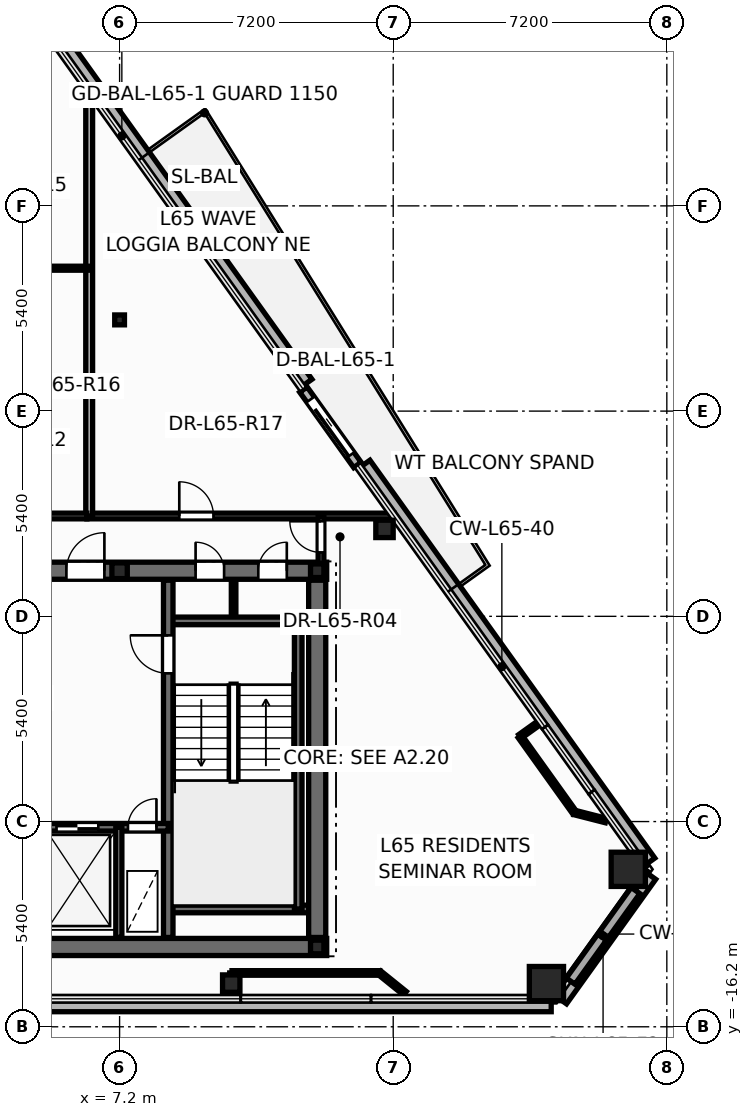
"""IFC4 building model, lengths in metres.
Left out: names, types, materials, properties, quantities, classifications, styles, units other than length and angle.
Written with IfcOpenShell. Run it as: python <this file> out.ifc"""

import sys

from ifc_helpers import new_model, si_unit, direction, frame, frame_2d, origin, origin_2d, place, context, subcontext, project, spatial, rectangle, hollow_rectangle, hollow_circle, i_section, extrude, element, fill, save


model = new_model("IFC4")
c1 = context("Model", 3, precision=1e-05, world=origin(), true_north=direction((0.0, 1.0)))
c2 = subcontext(c1, "Body", "Model", "MODEL_VIEW")
j1 = project(units=[si_unit("LENGTHUNIT", "METRE"), si_unit("PLANEANGLEUNIT", "RADIAN")], contexts=[c1])
p1 = place(None, origin())
s1 = spatial("IfcSite", under=j1, at=p1, CompositionType="ELEMENT")
p2 = place(p1, origin())
s2 = spatial("IfcBuilding", under=s1, at=p2, CompositionType="ELEMENT")
p3 = place(p2, frame((0.0, 0.0, 249.0)))
s3 = spatial("IfcBuildingStorey", under=s2, at=p3, CompositionType="ELEMENT", Elevation=249.0)
for number, where, z_axis, x_axis in (
    (1, (18.432, -15.063, 0.0), (0.0, 0.0, 1.0), (1.0, 0.0, 0.0)),
    (2, (20.585, -12.057, 0.0), (0.0, 0.0, 1.0), (1.0, 0.0, 0.0)),
):
    element("IfcColumn", number, at=place(p3, frame(where, z_axis=z_axis, x_axis=x_axis)), inside=s3, PredefinedType="COLUMN", context=c2, shape_type="SweptSolid", body=[
        extrude(hollow_rectangle(XDim=0.9, YDim=0.9, WallThickness=0.04, at=origin_2d()), origin(), (0.0, 0.0, 1.0), 3.6),
    ])
for number, where, z_axis, x_axis in (
    (3, (10.138, -15.063, 0.0), (0.0, 0.0, 1.0), (1.0, 0.0, 0.0)),
    (4, (14.171, -3.099, 0.0), (0.0, 0.0, 1.0), (1.0, 0.0, 0.0)),
    (5, (8.673, 4.579, 0.0), (0.0, 0.0, 1.0), (1.0, 0.0, 0.0)),
):
    element("IfcColumn", number, at=place(p3, frame(where, z_axis=z_axis, x_axis=x_axis)), inside=s3, PredefinedType="COLUMN", context=c2, shape_type="SweptSolid", body=[
        extrude(hollow_circle(Radius=0.229, WallThickness=0.016, at=origin_2d()), origin(), (0.0, 0.0, 1.0), 3.6),
    ])
for number, where, z_axis, x_axis in (
    (6, (12.4, -14.1, 0.0), (0.0, 0.0, 1.0), (1.0, 0.0, 0.0)),
    (7, (12.4, -4.2, 0.0), (0.0, 0.0, 1.0), (1.0, 0.0, 0.0)),
):
    element("IfcColumn", number, at=place(p3, frame(where, z_axis=z_axis, x_axis=x_axis)), inside=s3, PredefinedType="COLUMN", context=c2, shape_type="SweptSolid", body=[
        extrude(i_section(OverallWidth=0.352, OverallDepth=0.359, WebThickness=0.018, FlangeThickness=0.026, at=origin_2d()), origin(), (0.0, 0.0, 1.0), 3.6),
    ])
p4 = place(p3, frame((7.2, -4.2, 0.0), z_axis=(0.0, 0.0, 1.0), x_axis=(1.0, 0.0, 0.0)))
e8 = element("IfcColumn", 8, at=p4, inside=s3, PredefinedType="PILASTER", context=c2, shape_type="SweptSolid", body=[
    extrude(i_section(OverallWidth=0.405, OverallDepth=0.414, WebThickness=0.022, FlangeThickness=0.032, at=origin_2d()), origin(), (0.0, 0.0, 1.0), 3.6),
])
p5 = place(p3, frame((7.2, 2.4, 0.0), z_axis=(0.0, 0.0, 1.0), x_axis=(1.0, 0.0, 0.0)))
e9 = element("IfcColumn", 9, at=p5, inside=s3, PredefinedType="COLUMN", context=c2, shape_type="SweptSolid", body=[
    extrude(i_section(OverallWidth=0.256, OverallDepth=0.26, WebThickness=0.01, FlangeThickness=0.017, at=origin_2d()), origin(), (0.0, 0.0, 1.0), 3.6),
])
p6 = place(p3, frame((-18.558, -15.623, -0.2), z_axis=(0.0, 0.0, 1.0), x_axis=(1.0, 0.0, 0.0)))
e10 = element("IfcWall", 10, at=p6, inside=s3, PredefinedType="PARAPET", context=c2, shape_type="SweptSolid", body=[
    extrude(rectangle(XDim=37.115, YDim=0.36, at=frame_2d((18.558, 0.0))), origin(), (0.0, 0.0, 1.0), 0.38),
])
p7 = place(p3, frame((18.814, -15.491, -0.2), z_axis=(0.0, 0.0, 1.0), x_axis=(0.582223401732, 0.813028849719, 0.0)))
e11 = element("IfcWall", 11, at=p7, inside=s3, PredefinedType="PARAPET", context=c2, shape_type="SweptSolid", body=[
    extrude(rectangle(XDim=4.03, YDim=0.36, at=frame_2d((2.015, 0.0))), origin(), (0.0, 0.0, 1.0), 0.38),
])
p8 = place(p3, frame((21.137, -11.866, -0.2), z_axis=(0.0, 0.0, 1.0), x_axis=(-0.582197369703, 0.813047491055, 0.0)))
e12 = element("IfcWall", 12, at=p8, inside=s3, PredefinedType="PARAPET", context=c2, shape_type="SweptSolid", body=[
    extrude(rectangle(XDim=12.876, YDim=0.36, at=frame_2d((6.438, 0.0))), origin(), (0.0, 0.0, 1.0), 0.38),
])
p9 = place(p3, frame((12.115, 0.733, -0.2), z_axis=(0.0, 0.0, 1.0), x_axis=(-0.582205107077, 0.813041950513, 0.0)))
e13 = element("IfcWall", 13, at=p9, inside=s3, PredefinedType="PARAPET", context=c2, shape_type="SweptSolid", body=[
    extrude(rectangle(XDim=16.235, YDim=0.36, at=frame_2d((8.117, 0.0))), origin(), (0.0, 0.0, 1.0), 0.38),
])
p10 = place(p3, frame((13.458, -1.417, -0.015), z_axis=(0.0, 0.0, 1.0), x_axis=(-0.582146480264, 0.813083928949, 0.0)))
e14 = element("IfcWall", 14, at=p10, inside=s3, PredefinedType="STANDARD", context=c2, shape_type="SweptSolid", body=[
    extrude(rectangle(XDim=2.44, YDim=0.24, at=frame_2d((1.22, 0.0))), origin(), (0.0, 0.0, 1.0), 2.878),
])
p11 = place(p10, frame((0.32, 0.0, 0.015)))
e15 = element("IfcOpeningElement", 15, at=p11, cuts=e14, PredefinedType="OPENING", context=c2, shape_type="SweptSolid", body=[
    extrude(rectangle(XDim=1.806, YDim=2.204, at=frame_2d((0.9, 1.102))), frame((0.0, 0.13, 0.0), z_axis=(0.0, -1.0, 0.0), x_axis=(1.0, 0.0, 0.0)), (0.0, 0.0, 1.0), 0.26),
])
p12 = place(p3, frame((10.2, -5.52, 0.0), z_axis=(0.0, 0.0, 1.0), x_axis=(0.0, 1.0, 0.0)))
e16 = element("IfcWall", 16, at=p12, inside=s3, PredefinedType="PARTITIONING", context=c2, shape_type="SweptSolid", body=[
    extrude(rectangle(XDim=1.12, YDim=0.12, at=frame_2d((0.56, 0.0))), origin(), (0.0, 0.0, 1.0), 3.345),
])
p13 = place(p3, frame((-12.65, -14.1, 0.0), z_axis=(0.0, 0.0, 1.0), x_axis=(1.0, 0.0, 0.0)))
e17 = element("IfcWall", 17, at=p13, inside=s3, PredefinedType="SHEAR", context=c2, shape_type="SweptSolid", body=[
    extrude(rectangle(XDim=25.3, YDim=0.45, at=frame_2d((12.65, 0.0))), origin(), (0.0, 0.0, 1.0), 3.6),
])
p14 = place(p3, frame((-12.65, -4.2, 0.0), z_axis=(0.0, 0.0, 1.0), x_axis=(1.0, 0.0, 0.0)))
e18 = element("IfcWall", 18, at=p14, inside=s3, PredefinedType="SHEAR", context=c2, shape_type="SweptSolid", body=[
    extrude(rectangle(XDim=25.3, YDim=0.45, at=frame_2d((12.65, 0.0))), origin(), (0.0, 0.0, 1.0), 3.6),
])
p15 = place(p14, frame((0.95, 0.0, 0.0)))
e19 = element("IfcOpeningElement", 19, at=p15, cuts=e18, PredefinedType="OPENING", context=c2, shape_type="SweptSolid", body=[
    extrude(rectangle(XDim=0.756, YDim=2.054, at=frame_2d((0.375, 1.027))), frame((0.0, 0.235, 0.0), z_axis=(0.0, -1.0, 0.0), x_axis=(1.0, 0.0, 0.0)), (0.0, 0.0, 1.0), 0.47),
])
p16 = place(p14, frame((2.6, 0.0, 0.0)))
e20 = element("IfcOpeningElement", 20, at=p16, cuts=e18, PredefinedType="OPENING", context=c2, shape_type="SweptSolid", body=[
    extrude(rectangle(XDim=0.756, YDim=2.054, at=frame_2d((0.375, 1.027))), frame((0.0, 0.235, 0.0), z_axis=(0.0, -1.0, 0.0), x_axis=(1.0, 0.0, 0.0)), (0.0, 0.0, 1.0), 0.47),
])
p17 = place(p14, frame((21.85, 0.0, 0.0)))
e21 = element("IfcOpeningElement", 21, at=p17, cuts=e18, PredefinedType="OPENING", context=c2, shape_type="SweptSolid", body=[
    extrude(rectangle(XDim=0.756, YDim=2.054, at=frame_2d((0.375, 1.027))), frame((0.0, 0.235, 0.0), z_axis=(0.0, -1.0, 0.0), x_axis=(1.0, 0.0, 0.0)), (0.0, 0.0, 1.0), 0.47),
])
p18 = place(p14, frame((23.5, 0.0, 0.0)))
e22 = element("IfcOpeningElement", 22, at=p18, cuts=e18, PredefinedType="OPENING", context=c2, shape_type="SweptSolid", body=[
    extrude(rectangle(XDim=0.756, YDim=2.054, at=frame_2d((0.375, 1.027))), frame((0.0, 0.235, 0.0), z_axis=(0.0, -1.0, 0.0), x_axis=(1.0, 0.0, 0.0)), (0.0, 0.0, 1.0), 0.47),
])
p19 = place(p14, frame((5.85, 0.0, 0.0)))
e23 = element("IfcOpeningElement", 23, at=p19, cuts=e18, PredefinedType="OPENING", context=c2, shape_type="SweptSolid", body=[
    extrude(rectangle(XDim=1.006, YDim=2.104, at=frame_2d((0.5, 1.052))), frame((0.0, 0.235, 0.0), z_axis=(0.0, -1.0, 0.0), x_axis=(1.0, 0.0, 0.0)), (0.0, 0.0, 1.0), 0.47),
])
p20 = place(p14, frame((10.35, 0.0, 0.0)))
e24 = element("IfcOpeningElement", 24, at=p20, cuts=e18, PredefinedType="OPENING", context=c2, shape_type="SweptSolid", body=[
    extrude(rectangle(XDim=1.406, YDim=2.154, at=frame_2d((0.7, 1.077))), frame((0.0, 0.235, 0.0), z_axis=(0.0, -1.0, 0.0), x_axis=(1.0, 0.0, 0.0)), (0.0, 0.0, 1.0), 0.47),
])
p21 = place(p14, frame((18.45, 0.0, 0.0)))
e25 = element("IfcOpeningElement", 25, at=p21, cuts=e18, PredefinedType="OPENING", context=c2, shape_type="SweptSolid", body=[
    extrude(rectangle(XDim=1.006, YDim=2.104, at=frame_2d((0.5, 1.052))), frame((0.0, 0.235, 0.0), z_axis=(0.0, -1.0, 0.0), x_axis=(1.0, 0.0, 0.0)), (0.0, 0.0, 1.0), 0.47),
])
for number, where, z_axis, x_axis in (
    (26, (8.48, -5.52, 0.0), (0.0, 0.0, 1.0), (1.0, 0.0, 0.0)),
    (27, (8.48, -13.1, 0.0), (0.0, 0.0, 1.0), (1.0, 0.0, 0.0)),
):
    element("IfcWall", number, at=place(p3, frame(where, z_axis=z_axis, x_axis=x_axis)), inside=s3, PredefinedType="SOLIDWALL", context=c2, shape_type="SweptSolid", body=[
        extrude(rectangle(XDim=3.87, YDim=0.2, at=frame_2d((1.935, 0.0))), origin(), (0.0, 0.0, 1.0), 3.6),
    ])
p22 = place(p3, frame((11.9, -13.1, 0.0), z_axis=(0.0, 0.0, 1.0), x_axis=(0.0, 1.0, 0.0)))
e28 = element("IfcWall", 28, at=p22, inside=s3, PredefinedType="SOLIDWALL", context=c2, shape_type="SweptSolid", body=[
    extrude(rectangle(XDim=7.58, YDim=0.2, at=frame_2d((3.79, 0.0))), origin(), (0.0, 0.0, 1.0), 3.6),
])
p23 = place(p3, frame((8.48, -13.85, 0.0), z_axis=(0.0, 0.0, 1.0), x_axis=(0.0, 1.0, 0.0)))
e29 = element("IfcWall", 29, at=p23, inside=s3, PredefinedType="SHEAR", context=c2, shape_type="SweptSolid", body=[
    extrude(rectangle(XDim=9.4, YDim=0.25, at=frame_2d((4.7, 0.0))), origin(), (0.0, 0.0, 1.0), 3.6),
])
p24 = place(p23, frame((6.95, 0.0, 0.0)))
e30 = element("IfcOpeningElement", 30, at=p24, cuts=e29, PredefinedType="OPENING", context=c2, shape_type="SweptSolid", body=[
    extrude(rectangle(XDim=1.006, YDim=2.104, at=frame_2d((0.5, 1.052))), frame((0.0, 0.135, 0.0), z_axis=(0.0, -1.0, 0.0), x_axis=(1.0, 0.0, 0.0)), (0.0, 0.0, 1.0), 0.27),
])
p25 = place(p3, frame((5.12, -10.95, 0.0), z_axis=(0.0, 0.0, 1.0), x_axis=(1.0, 0.0, 0.0)))
e31 = element("IfcWall", 31, at=p25, inside=s3, PredefinedType="SOLIDWALL", context=c2, shape_type="SweptSolid", body=[
    extrude(rectangle(XDim=3.36, YDim=0.2, at=frame_2d((1.68, 0.0))), origin(), (0.0, 0.0, 1.0), 3.6),
])
p26 = place(p25, frame((0.42, 0.0, 0.0)))
e32 = element("IfcOpeningElement", 32, at=p26, cuts=e31, PredefinedType="OPENING", context=c2, shape_type="SweptSolid", body=[
    extrude(rectangle(XDim=1.106, YDim=2.104, at=frame_2d((0.55, 1.052))), frame((0.0, 0.11, 0.0), z_axis=(0.0, -1.0, 0.0), x_axis=(1.0, 0.0, 0.0)), (0.0, 0.0, 1.0), 0.22),
])
p27 = place(p25, frame((2.3, 0.0, 0.0)))
e33 = element("IfcOpeningElement", 33, at=p27, cuts=e31, PredefinedType="OPENING", context=c2, shape_type="SweptSolid", body=[
    extrude(rectangle(XDim=0.756, YDim=2.054, at=frame_2d((0.375, 1.027))), frame((0.0, 0.11, 0.0), z_axis=(0.0, -1.0, 0.0), x_axis=(1.0, 0.0, 0.0)), (0.0, 0.0, 1.0), 0.22),
])
p28 = place(p3, frame((7.18, -13.85, 0.0), z_axis=(0.0, 0.0, 1.0), x_axis=(0.0, 1.0, 0.0)))
e34 = element("IfcWall", 34, at=p28, inside=s3, PredefinedType="PARTITIONING", context=c2, shape_type="SweptSolid", body=[
    extrude(rectangle(XDim=2.9, YDim=0.16, at=frame_2d((1.45, 0.0))), origin(), (0.0, 0.0, 1.0), 2.57),
])
p29 = place(p3, frame((12.4, -13.85, 0.0), z_axis=(0.0, 0.0, 1.0), x_axis=(0.0, 1.0, 0.0)))
e35 = element("IfcWall", 35, at=p29, inside=s3, PredefinedType="SHEAR", context=c2, shape_type="SweptSolid", body=[
    extrude(rectangle(XDim=9.4, YDim=0.45, at=frame_2d((4.7, 0.0))), origin(), (0.0, 0.0, 1.0), 3.6),
])
p30 = place(p3, frame((6.34, -2.76, 0.0), z_axis=(0.0, 0.0, 1.0), x_axis=(1.0, 0.0, 0.0)))
e36 = element("IfcWall", 36, at=p30, inside=s3, PredefinedType="PARTITIONING", context=c2, shape_type="SweptSolid", body=[
    extrude(rectangle(XDim=8.08, YDim=0.15, at=frame_2d((4.04, 0.0))), origin(), (0.0, 0.0, 1.0), 2.32),
])
p31 = place(p30, frame((2.431, 0.0, 0.0)))
e37 = element("IfcOpeningElement", 37, at=p31, cuts=e36, PredefinedType="OPENING", context=c2, shape_type="SweptSolid", body=[
    extrude(rectangle(XDim=0.906, YDim=2.104, at=frame_2d((0.45, 1.052))), frame((0.0, 0.085, 0.0), z_axis=(0.0, -1.0, 0.0), x_axis=(1.0, 0.0, 0.0)), (0.0, 0.0, 1.0), 0.17),
])
p32 = place(p3, frame((6.4, -2.76, 0.0), z_axis=(0.0, 0.0, 1.0), x_axis=(0.0, 1.0, 0.0)))
e38 = element("IfcWall", 38, at=p32, inside=s3, PredefinedType="PARTITIONING", context=c2, shape_type="SweptSolid", body=[
    extrude(rectangle(XDim=11.2, YDim=0.18, at=frame_2d((5.6, 0.0))), origin(), (0.0, 0.0, 1.0), 2.32),
])
p33 = place(p3, frame((10.158, -14.783, 0.0), z_axis=(0.0, 0.0, 1.0), x_axis=(1.0, 0.0, 0.0)))
e39 = element("IfcWall", 39, at=p33, inside=s3, PredefinedType="PARTITIONING", context=c2, shape_type="SweptSolid", body=[
    extrude(rectangle(XDim=3.886, YDim=0.12, at=frame_2d((1.943, 0.0))), origin(), (0.0, 0.0, 1.0), 2.863),
])
p34 = place(p3, frame((3.04, -2.76, 0.0), z_axis=(0.0, 0.0, 1.0), x_axis=(1.0, 0.0, 0.0)))
e40 = element("IfcWall", 40, at=p34, inside=s3, PredefinedType="PARTITIONING", context=c2, shape_type="SweptSolid", body=[
    extrude(rectangle(XDim=3.298, YDim=0.15, at=frame_2d((1.649, 0.0))), origin(), (0.0, 0.0, 1.0), 2.964),
])
p35 = place(p34, frame((0.4, 0.0, 0.0)))
e41 = element("IfcOpeningElement", 41, at=p35, cuts=e40, PredefinedType="OPENING", context=c2, shape_type="SweptSolid", body=[
    extrude(rectangle(XDim=0.906, YDim=2.104, at=frame_2d((0.45, 1.052))), frame((0.0, 0.085, 0.0), z_axis=(0.0, -1.0, 0.0), x_axis=(1.0, 0.0, 0.0)), (0.0, 0.0, 1.0), 0.17),
])
p36 = place(p3, frame((3.38, 3.76, 0.0), z_axis=(0.0, 0.0, 1.0), x_axis=(1.0, 0.0, 0.0)))
e42 = element("IfcWall", 42, at=p36, inside=s3, PredefinedType="PARTITIONING", context=c2, shape_type="SweptSolid", body=[
    extrude(rectangle(XDim=3.02, YDim=0.105, at=frame_2d((1.51, 0.0))), origin(), (0.0, 0.0, 1.0), 3.345),
])
p37 = place(p36, frame((0.397, 0.0, 0.0)))
e43 = element("IfcOpeningElement", 43, at=p37, cuts=e42, PredefinedType="OPENING", context=c2, shape_type="SweptSolid", body=[
    extrude(rectangle(XDim=0.886, YDim=2.104, at=frame_2d((0.44, 1.052))), frame((0.0, 0.062, 0.0), z_axis=(0.0, -1.0, 0.0), x_axis=(1.0, 0.0, 0.0)), (0.0, 0.0, 1.0), 0.125),
])
p38 = place(p3, frame((19.17, -10.562, 0.0), z_axis=(0.0, 0.0, 1.0), x_axis=(-0.582157358489, 0.81307614032, 0.0)))
e44 = element("IfcWall", 44, at=p38, inside=s3, PredefinedType="PARTITIONING", context=c2, shape_type="SweptSolid", body=[
    extrude(rectangle(XDim=2.461, YDim=0.12, at=frame_2d((1.23, 0.0))), origin(), (0.0, 0.0, 1.0), 2.32),
])
p39 = place(p3, frame((12.5, -4.24, 0.0), z_axis=(0.0, 0.0, 1.0), x_axis=(0.0, 1.0, 0.0)))
e45 = element("IfcWall", 45, at=p39, inside=s3, PredefinedType="PARTITIONING", context=c2, shape_type="SweptSolid", body=[
    extrude(rectangle(XDim=1.48, YDim=0.15, at=frame_2d((0.74, 0.0))), origin(), (0.0, 0.0, 1.0), 2.32),
])
p40 = place(p39, frame((0.522, 0.0, 0.0)))
e46 = element("IfcOpeningElement", 46, at=p40, cuts=e45, PredefinedType="OPENING", context=c2, shape_type="SweptSolid", body=[
    extrude(rectangle(XDim=0.826, YDim=2.104, at=frame_2d((0.41, 1.052))), frame((0.0, 0.085, 0.0), z_axis=(0.0, -1.0, 0.0), x_axis=(1.0, 0.0, 0.0)), (0.0, 0.0, 1.0), 0.17),
])
p41 = place(p3, frame((14.044, -14.783, 0.0), z_axis=(0.0, 0.0, 1.0), x_axis=(0.778769450364, -0.62731024476, 0.0)))
e47 = element("IfcWall", 47, at=p41, inside=s3, PredefinedType="PARTITIONING", context=c2, shape_type="SweptSolid", body=[
    extrude(rectangle(XDim=0.853, YDim=0.12, at=frame_2d((0.426, 0.0))), origin(), (0.0, 0.0, 1.0), 2.863),
])
p42 = place(p3, frame((19.996, -10.773, 0.0), z_axis=(0.0, 0.0, 1.0), x_axis=(-0.968778693612, 0.247927091708, 0.0)))
e48 = element("IfcWall", 48, at=p42, inside=s3, PredefinedType="PARTITIONING", context=c2, shape_type="SweptSolid", body=[
    extrude(rectangle(XDim=0.852, YDim=0.12, at=frame_2d((0.426, 0.0))), origin(), (0.0, 0.0, 1.0), 2.32),
])
p43 = place(p3, frame((17.738, -8.561, 0.0), z_axis=(0.0, 0.0, 1.0), x_axis=(0.813142011208, 0.582065348229, 0.0)))
e49 = element("IfcWall", 49, at=p43, inside=s3, PredefinedType="PARTITIONING", context=c2, shape_type="SweptSolid", body=[
    extrude(rectangle(XDim=0.67, YDim=0.12, at=frame_2d((0.335, 0.0))), origin(), (0.0, 0.0, 1.0), 2.863),
])
p44 = place(p3, frame((10.158, -15.453, 0.0), z_axis=(0.0, 0.0, 1.0), x_axis=(0.0, 1.0, 0.0)))
e50 = element("IfcWall", 50, at=p44, inside=s3, PredefinedType="PARTITIONING", context=c2, shape_type="SweptSolid", body=[
    extrude(rectangle(XDim=0.67, YDim=0.12, at=frame_2d((0.335, 0.0))), origin(), (0.0, 0.0, 1.0), 2.863),
])
p45 = place(p11, origin())
e51 = element("IfcDoor", 51, at=p45, inside=s3, OperationType="SLIDING_TO_LEFT", PredefinedType="DOOR", context=c2, shape_type="SweptSolid", body=[
    extrude(rectangle(XDim=1.8, YDim=2.2, at=frame_2d((0.9, 1.1))), frame((0.0, 0.025, 0.0), z_axis=(0.0, -1.0, 0.0), x_axis=(1.0, 0.0, 0.0)), (0.0, 0.0, 1.0), 0.05),
])
fill(e15, e51)
p46 = place(p24, origin())
e52 = element("IfcDoor", 52, at=p46, inside=s3, OperationType="SINGLE_SWING_RIGHT", PredefinedType="DOOR", context=c2, shape_type="SweptSolid", body=[
    extrude(rectangle(XDim=1.0, YDim=2.1, at=frame_2d((0.5, 1.05))), frame((0.0, 0.025, 0.0), z_axis=(0.0, -1.0, 0.0), x_axis=(1.0, 0.0, 0.0)), (0.0, 0.0, 1.0), 0.05),
])
fill(e30, e52)
p47 = place(p26, origin())
e53 = element("IfcDoor", 53, at=p47, inside=s3, OperationType="DOUBLE_DOOR_SLIDING", PredefinedType="DOOR", context=c2, shape_type="SweptSolid", body=[
    extrude(rectangle(XDim=1.1, YDim=2.1, at=frame_2d((0.55, 1.05))), frame((0.0, 0.025, 0.0), z_axis=(0.0, -1.0, 0.0), x_axis=(1.0, 0.0, 0.0)), (0.0, 0.0, 1.0), 0.05),
])
fill(e32, e53)
p48 = place(p27, origin())
e54 = element("IfcDoor", 54, at=p48, inside=s3, OperationType="SINGLE_SWING_RIGHT", PredefinedType="DOOR", context=c2, shape_type="SweptSolid", body=[
    extrude(rectangle(XDim=0.75, YDim=2.05, at=frame_2d((0.375, 1.025))), frame((0.0, 0.025, 0.0), z_axis=(0.0, -1.0, 0.0), x_axis=(1.0, 0.0, 0.0)), (0.0, 0.0, 1.0), 0.05),
])
fill(e33, e54)
p49 = place(p17, origin())
e55 = element("IfcDoor", 55, at=p49, inside=s3, OperationType="SINGLE_SWING_LEFT", PredefinedType="DOOR", context=c2, shape_type="SweptSolid", body=[
    extrude(rectangle(XDim=0.75, YDim=2.05, at=frame_2d((0.375, 1.025))), frame((0.0, 0.025, 0.0), z_axis=(0.0, -1.0, 0.0), x_axis=(1.0, 0.0, 0.0)), (0.0, 0.0, 1.0), 0.05),
])
fill(e21, e55)
p50 = place(p18, origin())
e56 = element("IfcDoor", 56, at=p50, inside=s3, OperationType="SINGLE_SWING_RIGHT", PredefinedType="DOOR", context=c2, shape_type="SweptSolid", body=[
    extrude(rectangle(XDim=0.75, YDim=2.05, at=frame_2d((0.375, 1.025))), frame((0.0, 0.025, 0.0), z_axis=(0.0, -1.0, 0.0), x_axis=(1.0, 0.0, 0.0)), (0.0, 0.0, 1.0), 0.05),
])
fill(e22, e56)
p51 = place(p21, origin())
e57 = element("IfcDoor", 57, at=p51, inside=s3, OperationType="SINGLE_SWING_RIGHT", PredefinedType="DOOR", context=c2, shape_type="SweptSolid", body=[
    extrude(rectangle(XDim=1.0, YDim=2.1, at=frame_2d((0.5, 1.05))), frame((0.0, 0.025, 0.0), z_axis=(0.0, -1.0, 0.0), x_axis=(1.0, 0.0, 0.0)), (0.0, 0.0, 1.0), 0.05),
])
fill(e25, e57)
p52 = place(p40, origin())
e58 = element("IfcDoor", 58, at=p52, inside=s3, OperationType="SINGLE_SWING_RIGHT", PredefinedType="DOOR", context=c2, shape_type="SweptSolid", body=[
    extrude(rectangle(XDim=0.82, YDim=2.1, at=frame_2d((0.41, 1.05))), frame((0.0, 0.025, 0.0), z_axis=(0.0, -1.0, 0.0), x_axis=(1.0, 0.0, 0.0)), (0.0, 0.0, 1.0), 0.05),
])
fill(e46, e58)
p53 = place(p31, origin())
e59 = element("IfcDoor", 59, at=p53, inside=s3, OperationType="SINGLE_SWING_LEFT", PredefinedType="DOOR", context=c2, shape_type="SweptSolid", body=[
    extrude(rectangle(XDim=0.9, YDim=2.1, at=frame_2d((0.45, 1.05))), frame((0.0, 0.025, 0.0), z_axis=(0.0, -1.0, 0.0), x_axis=(1.0, 0.0, 0.0)), (0.0, 0.0, 1.0), 0.05),
])
fill(e37, e59)
save(model, sys.argv[1])
